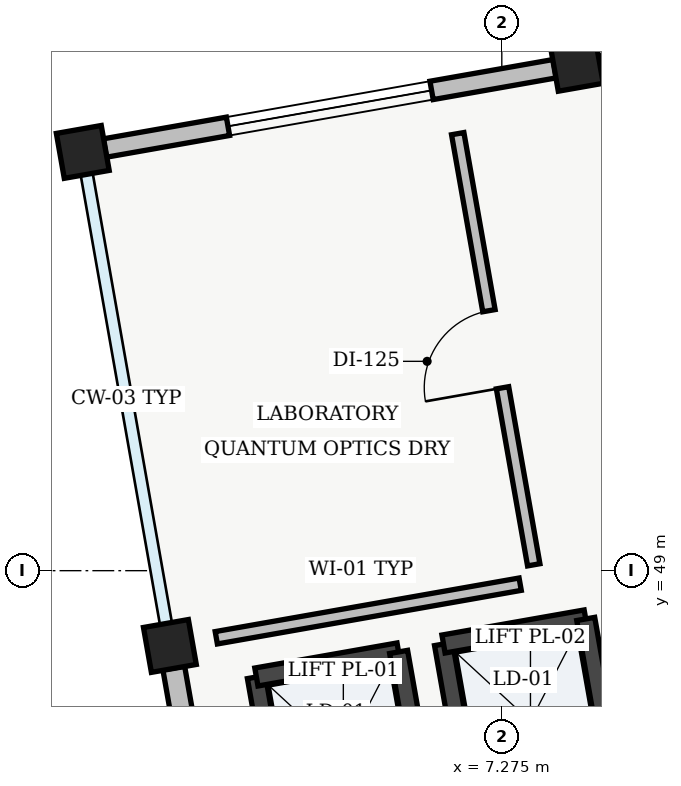
"""IFC4 building model, lengths in metres.
Left out: names, types, materials, properties, quantities, classifications, styles, units other than length and angle.
Written with IfcOpenShell. Run it as: python <this file> out.ifc"""

import sys

from ifc_helpers import new_model, si_unit, direction, frame, frame_2d, origin, origin_2d, place, context, subcontext, project, spatial, rectangle, extrude, element, fill, save


model = new_model("IFC4")
c1 = context("Model", 3, precision=1e-05, world=origin(), true_north=direction((0.0, 1.0)))
c2 = subcontext(c1, "Body", "Model", "MODEL_VIEW")
j1 = project(units=[si_unit("LENGTHUNIT", "METRE"), si_unit("PLANEANGLEUNIT", "RADIAN")], contexts=[c1])
p1 = place(None, origin())
s1 = spatial("IfcSite", under=j1, at=p1, CompositionType="ELEMENT")
p2 = place(p1, origin())
s2 = spatial("IfcBuilding", under=s1, at=p2, CompositionType="ELEMENT")
p3 = place(p2, frame((0.0, 0.0, 27.6)))
s3 = spatial("IfcBuildingStorey", under=s2, at=p3, CompositionType="ELEMENT", Elevation=27.6)
for number, where, z_axis, x_axis in (
    (1, (2.908, 48.01, 0.0), (0.0, 0.0, 1.0), (0.985, 0.174, 0.0)),
    (2, (1.762, 54.509, 0.0), (0.0, 0.0, 1.0), (0.985, 0.174, 0.0)),
    (3, (8.261, 55.655, 0.0), (0.0, 0.0, 1.0), (0.985, 0.174, 0.0)),
):
    element("IfcColumn", number, at=place(p3, frame(where, z_axis=z_axis, x_axis=x_axis)), inside=s3, PredefinedType="COLUMN", context=c2, shape_type="SweptSolid", body=[
        extrude(rectangle(XDim=0.6, YDim=0.6, at=origin_2d()), origin(), (0.0, 0.0, 1.0), 4.32),
    ])
p4 = place(p3, frame((4.003, 41.8, 0.0), z_axis=(0.0, 0.0, 1.0), x_axis=(-0.173660194111, 0.984805634113, 0.0)))
e4 = element("IfcWall", 4, at=p4, inside=s3, PredefinedType="STANDARD", context=c2, shape_type="SweptSolid", body=[
    extrude(rectangle(XDim=6.01, YDim=0.29, at=frame_2d((3.005, 0.0))), origin(), (0.0, 0.0, 1.0), 3.855),
])
p5 = place(p4, frame((2.105, 0.0, 0.95)))
e5 = element("IfcOpeningElement", 5, at=p5, cuts=e4, PredefinedType="OPENING", context=c2, shape_type="SweptSolid", body=[
    extrude(rectangle(XDim=1.8, YDim=1.65, at=frame_2d((0.9, 0.825))), frame((0.0, 0.145, 0.0), z_axis=(0.0, -1.0, 0.0), x_axis=(1.0, 0.0, 0.0)), (0.0, 0.0, 1.0), 0.29),
])
p6 = place(p3, frame((2.052, 54.56, 0.0), z_axis=(0.0, 0.0, 1.0), x_axis=(0.984805634113, 0.173660194111, 0.0)))
e6 = element("IfcWall", 6, at=p6, inside=s3, PredefinedType="STANDARD", context=c2, shape_type="SweptSolid", body=[
    extrude(rectangle(XDim=6.01, YDim=0.245, at=frame_2d((3.005, 0.0))), origin(), (0.0, 0.0, 1.0), 3.855),
])
p7 = place(p6, frame((1.645, 0.0, 0.95)))
e7 = element("IfcOpeningElement", 7, at=p7, cuts=e6, PredefinedType="OPENING", context=c2, shape_type="SweptSolid", body=[
    extrude(rectangle(XDim=2.72, YDim=1.44, at=frame_2d((1.36, 0.72))), frame((0.0, 0.123, 0.0), z_axis=(0.0, -1.0, 0.0), x_axis=(1.0, 0.0, 0.0)), (0.0, 0.0, 1.0), 0.245),
])
p8 = place(p3, frame((4.463, 45.237, 0.0), z_axis=(0.0, 0.0, 1.0), x_axis=(-0.173646056486, 0.984808127031, 0.0)))
e8 = element("IfcWall", 8, at=p8, inside=s3, PredefinedType="SHEAR", context=c2, shape_type="SweptSolid", body=[
    extrude(rectangle(XDim=2.4, YDim=0.24, at=frame_2d((1.2, 0.0))), origin(), (0.0, 0.0, 1.0), 4.28),
])
p9 = place(p3, frame((4.046, 47.601, 0.0), z_axis=(0.0, 0.0, 1.0), x_axis=(0.984793905749, 0.173726691098, 0.0)))
e9 = element("IfcWall", 9, at=p9, inside=s3, PredefinedType="SHEAR", context=c2, shape_type="SweptSolid", body=[
    extrude(rectangle(XDim=1.9, YDim=0.24, at=frame_2d((0.95, 0.0))), origin(), (0.0, 0.0, 1.0), 4.28),
])
for number, where, z_axis, x_axis in (
    (10, (5.917, 47.931, 0.0), (0.0, 0.0, 1.0), (0.174, -0.985, 0.0)),
    (11, (6.925, 45.671, 0.0), (0.0, 0.0, 1.0), (-0.174, 0.985, 0.0)),
):
    element("IfcWall", number, at=place(p3, frame(where, z_axis=z_axis, x_axis=x_axis)), inside=s3, PredefinedType="SHEAR", context=c2, shape_type="SweptSolid", body=[
        extrude(rectangle(XDim=2.4, YDim=0.24, at=frame_2d((1.2, 0.0))), origin(), (0.0, 0.0, 1.0), 4.28),
    ])
p10 = place(p3, frame((6.508, 48.035, 0.0), z_axis=(0.0, 0.0, 1.0), x_axis=(0.984793905749, 0.173726691098, 0.0)))
e12 = element("IfcWall", 12, at=p10, inside=s3, PredefinedType="SHEAR", context=c2, shape_type="SweptSolid", body=[
    extrude(rectangle(XDim=1.9, YDim=0.24, at=frame_2d((0.95, 0.0))), origin(), (0.0, 0.0, 1.0), 4.28),
])
p11 = place(p3, frame((8.379, 48.365, 0.0), z_axis=(0.0, 0.0, 1.0), x_axis=(0.173646056486, -0.984808127031, 0.0)))
e13 = element("IfcWall", 13, at=p11, inside=s3, PredefinedType="SHEAR", context=c2, shape_type="SweptSolid", body=[
    extrude(rectangle(XDim=2.4, YDim=0.24, at=frame_2d((1.2, 0.0))), origin(), (0.0, 0.0, 1.0), 4.28),
])
p12 = place(p3, frame((3.518, 48.117, 0.0), z_axis=(0.0, 0.0, 1.0), x_axis=(0.984816834462, 0.173596666326, 0.0)))
e14 = element("IfcWall", 14, at=p12, inside=s3, PredefinedType="PARTITIONING", context=c2, shape_type="SweptSolid", body=[
    extrude(rectangle(XDim=4.06, YDim=0.165, at=frame_2d((2.03, 0.0))), origin(), (0.0, 0.0, 1.0), 3.705),
])
p13 = place(p3, frame((7.695, 49.077, 0.0), z_axis=(0.0, 0.0, 1.0), x_axis=(-0.173649928941, 0.984807444214, 0.0)))
e15 = element("IfcWall", 15, at=p13, inside=s3, PredefinedType="PARTITIONING", context=c2, shape_type="SweptSolid", body=[
    extrude(rectangle(XDim=5.76, YDim=0.165, at=frame_2d((2.88, 0.0))), origin(), (0.0, 0.0, 1.0), 3.95),
])
p14 = place(p13, frame((2.365, 0.0, 0.0)))
e16 = element("IfcOpeningElement", 16, at=p14, cuts=e15, PredefinedType="OPENING", context=c2, shape_type="SweptSolid", body=[
    extrude(rectangle(XDim=1.03, YDim=2.16, at=frame_2d((0.515, 1.08))), frame((0.0, 0.083, 0.0), z_axis=(0.0, -1.0, 0.0), x_axis=(1.0, 0.0, 0.0)), (0.0, 0.0, 1.0), 0.165),
])
p15 = place(p7, origin())
e17 = element("IfcWindow", 17, at=p15, inside=s3, PartitioningType="SINGLE_PANEL", PredefinedType="WINDOW", context=c2, shape_type="SweptSolid", body=[
    extrude(rectangle(XDim=2.72, YDim=1.44, at=frame_2d((1.36, 0.72))), frame((0.0, 0.03, 0.0), z_axis=(0.0, -1.0, 0.0), x_axis=(1.0, 0.0, 0.0)), (0.0, 0.0, 1.0), 0.06),
])
fill(e7, e17)
p16 = place(p14, origin())
e18 = element("IfcDoor", 18, at=p16, inside=s3, OperationType="SINGLE_SWING_LEFT", PredefinedType="DOOR", context=c2, shape_type="SweptSolid", body=[
    extrude(rectangle(XDim=1.03, YDim=2.16, at=frame_2d((0.515, 1.08))), frame((0.0, 0.025, 0.0), z_axis=(0.0, -1.0, 0.0), x_axis=(1.0, 0.0, 0.0)), (0.0, 0.0, 1.0), 0.05),
])
fill(e16, e18)
save(model, sys.argv[1])
